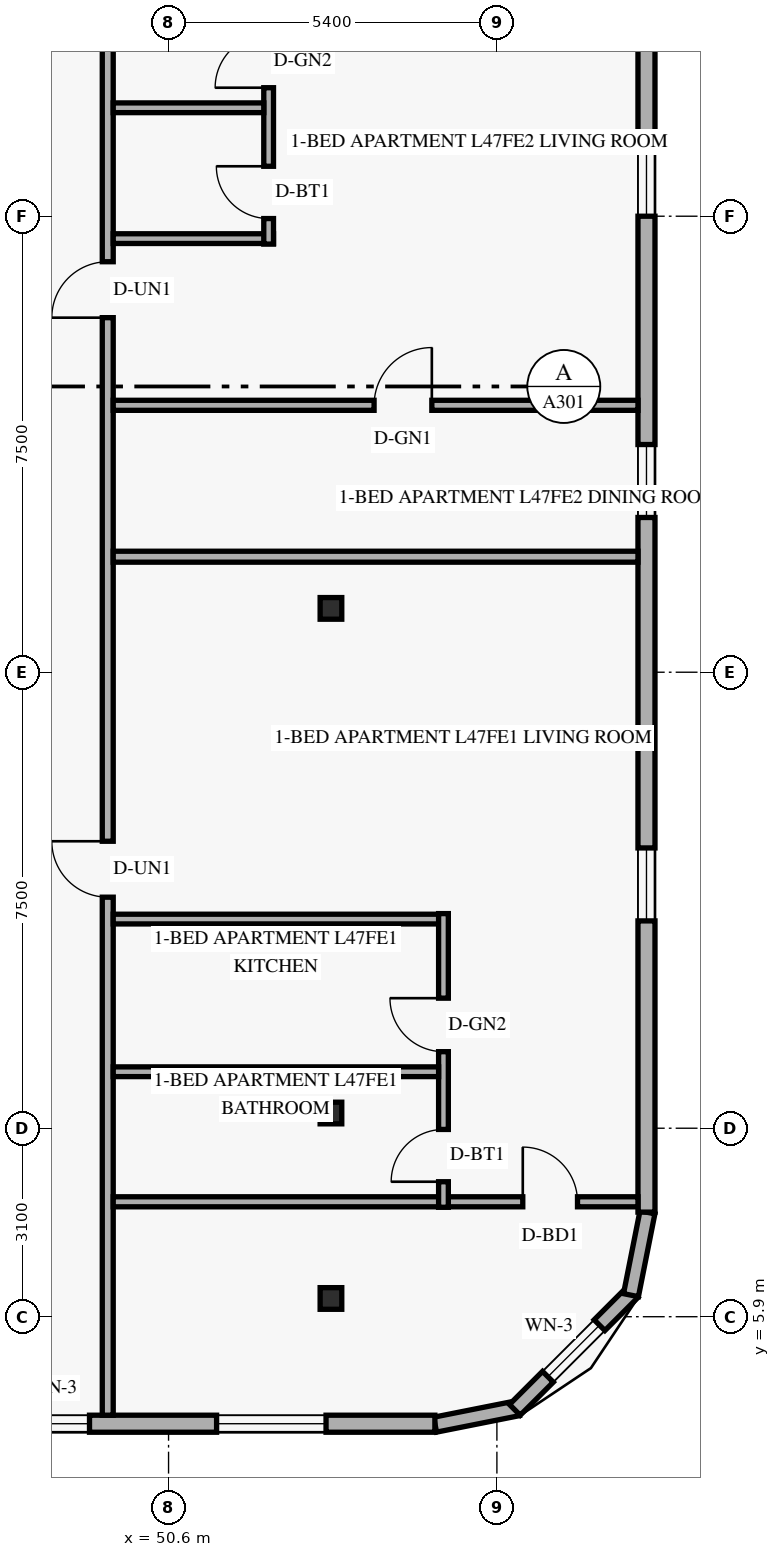
"""IFC4 building model, lengths in metres.
Left out: names, types, materials, properties, quantities, classifications, styles, units other than length and angle.
Written with IfcOpenShell. Run it as: python <this file> out.ifc"""

import sys

from ifc_helpers import new_model, si_unit, direction, frame, frame_2d, origin, origin_2d, place, context, subcontext, project, spatial, rectangle, hollow_rectangle, extrude, element, fill, save


model = new_model("IFC4")
c1 = context("Model", 3, precision=1e-05, world=origin(), true_north=direction((0.0, 1.0)))
c2 = subcontext(c1, "Body", "Model", "MODEL_VIEW")
j1 = project(units=[si_unit("LENGTHUNIT", "METRE"), si_unit("PLANEANGLEUNIT", "RADIAN")], contexts=[c1])
p1 = place(None, origin())
s1 = spatial("IfcSite", under=j1, at=p1, CompositionType="ELEMENT")
p2 = place(p1, origin())
s2 = spatial("IfcBuilding", under=s1, at=p2, CompositionType="ELEMENT")
p3 = place(p2, frame((0.0, 0.0, 181.2)))
s3 = spatial("IfcBuildingStorey", under=s2, at=p3, CompositionType="ELEMENT", Elevation=181.2)
for number, where, z_axis, x_axis in (
    (1, (53.167, 6.2, 0.0), (0.058, 0.0, 0.998), (0.0, 1.0, 0.0)),
    (2, (53.167, 9.25, 0.0), (0.058, 0.0, 0.998), (0.0, 1.0, 0.0)),
    (3, (53.167, 17.55, 0.0), (0.058, 0.0, 0.998), (0.0, 1.0, 0.0)),
):
    element("IfcColumn", number, at=place(p3, frame(where, z_axis=z_axis, x_axis=x_axis)), inside=s3, PredefinedType="COLUMN", context=c2, shape_type="SweptSolid", body=[
        extrude(hollow_rectangle(XDim=0.356, YDim=0.356, WallThickness=0.016, at=origin_2d()), origin(), (0.0, 0.0, 1.0), 3.606),
    ])
p4 = place(p3, frame((54.983, 4.124, 0.0), z_axis=(0.0, 0.0, 1.0), x_axis=(0.980809899341, 0.19496651342, 0.0)))
e4 = element("IfcWall", 4, at=p4, inside=s3, PredefinedType="SOLIDWALL", context=c2, shape_type="SweptSolid", body=[
    extrude(rectangle(XDim=1.389, YDim=0.25, at=frame_2d((0.694, 0.0))), origin(), (0.0, 0.0, 1.0), 3.36),
])
p5 = place(p3, frame((56.295, 4.368, 0.0), z_axis=(0.0, 0.0, 1.0), x_axis=(0.707106781187, 0.707106781187, 0.0)))
e5 = element("IfcWall", 5, at=p5, inside=s3, PredefinedType="SOLIDWALL", context=c2, shape_type="SweptSolid", body=[
    extrude(rectangle(XDim=2.739, YDim=0.25, at=frame_2d((1.37, 0.0))), origin(), (0.0, 0.0, 1.0), 3.36),
])
p6 = place(p5, frame((0.77, 0.0, 0.85)))
e6 = element("IfcOpeningElement", 6, at=p6, cuts=e5, PredefinedType="OPENING", context=c2, shape_type="SweptSolid", body=[
    extrude(rectangle(XDim=1.2, YDim=1.5, at=frame_2d((0.6, 0.75))), frame((0.0, 0.135, 0.0), z_axis=(0.0, -1.0, 0.0), x_axis=(1.0, 0.0, 0.0)), (0.0, 0.0, 1.0), 0.27),
])
p7 = place(p3, frame((58.205, 6.254, 0.0), z_axis=(0.0, 0.0, 1.0), x_axis=(0.19496651342, 0.980809899341, 0.0)))
e7 = element("IfcWall", 7, at=p7, inside=s3, PredefinedType="SOLIDWALL", context=c2, shape_type="SweptSolid", body=[
    extrude(rectangle(XDim=1.389, YDim=0.25, at=frame_2d((0.694, 0.0))), origin(), (0.0, 0.0, 1.0), 3.36),
])
p8 = place(p3, frame((21.22, 4.14, 0.0), z_axis=(0.0, 0.0, 1.0), x_axis=(1.0, 0.0, 0.0)))
e8 = element("IfcWall", 8, at=p8, inside=s3, PredefinedType="SOLIDWALL", context=c2, shape_type="SweptSolid", body=[
    extrude(rectangle(XDim=33.76, YDim=0.28, at=frame_2d((16.88, 0.0))), origin(), (0.0, 0.0, 1.0), 3.36),
])
p9 = place(p8, frame((1.905, 0.0, 0.85)))
e9 = element("IfcOpeningElement", 9, at=p9, cuts=e8, PredefinedType="OPENING", context=c2, shape_type="SweptSolid", body=[
    extrude(rectangle(XDim=1.8, YDim=1.6, at=frame_2d((0.9, 0.8))), frame((0.0, 0.15, 0.0), z_axis=(0.0, -1.0, 0.0), x_axis=(1.0, 0.0, 0.0)), (0.0, 0.0, 1.0), 0.3),
])
p10 = place(p8, frame((8.79, 0.0, 0.85)))
e10 = element("IfcOpeningElement", 10, at=p10, cuts=e8, PredefinedType="OPENING", context=c2, shape_type="SweptSolid", body=[
    extrude(rectangle(XDim=1.8, YDim=1.6, at=frame_2d((0.9, 0.8))), frame((0.0, 0.15, 0.0), z_axis=(0.0, -1.0, 0.0), x_axis=(1.0, 0.0, 0.0)), (0.0, 0.0, 1.0), 0.3),
])
p11 = place(p8, frame((14.665, 0.0, 0.85)))
e11 = element("IfcOpeningElement", 11, at=p11, cuts=e8, PredefinedType="OPENING", context=c2, shape_type="SweptSolid", body=[
    extrude(rectangle(XDim=1.2, YDim=1.5, at=frame_2d((0.6, 0.75))), frame((0.0, 0.15, 0.0), z_axis=(0.0, -1.0, 0.0), x_axis=(1.0, 0.0, 0.0)), (0.0, 0.0, 1.0), 0.3),
])
p12 = place(p8, frame((18.525, 0.0, 0.85)))
e12 = element("IfcOpeningElement", 12, at=p12, cuts=e8, PredefinedType="OPENING", context=c2, shape_type="SweptSolid", body=[
    extrude(rectangle(XDim=1.8, YDim=1.6, at=frame_2d((0.9, 0.8))), frame((0.0, 0.15, 0.0), z_axis=(0.0, -1.0, 0.0), x_axis=(1.0, 0.0, 0.0)), (0.0, 0.0, 1.0), 0.3),
])
p13 = place(p8, frame((23.65, 0.0, 0.85)))
e13 = element("IfcOpeningElement", 13, at=p13, cuts=e8, PredefinedType="OPENING", context=c2, shape_type="SweptSolid", body=[
    extrude(rectangle(XDim=1.8, YDim=1.6, at=frame_2d((0.9, 0.8))), frame((0.0, 0.15, 0.0), z_axis=(0.0, -1.0, 0.0), x_axis=(1.0, 0.0, 0.0)), (0.0, 0.0, 1.0), 0.3),
])
p14 = place(p8, frame((26.88, 0.0, 0.85)))
e14 = element("IfcOpeningElement", 14, at=p14, cuts=e8, PredefinedType="OPENING", context=c2, shape_type="SweptSolid", body=[
    extrude(rectangle(XDim=1.2, YDim=1.5, at=frame_2d((0.6, 0.75))), frame((0.0, 0.15, 0.0), z_axis=(0.0, -1.0, 0.0), x_axis=(1.0, 0.0, 0.0)), (0.0, 0.0, 1.0), 0.3),
])
p15 = place(p8, frame((30.17, 0.0, 0.85)))
e15 = element("IfcOpeningElement", 15, at=p15, cuts=e8, PredefinedType="OPENING", context=c2, shape_type="SweptSolid", body=[
    extrude(rectangle(XDim=1.8, YDim=1.6, at=frame_2d((0.9, 0.8))), frame((0.0, 0.15, 0.0), z_axis=(0.0, -1.0, 0.0), x_axis=(1.0, 0.0, 0.0)), (0.0, 0.0, 1.0), 0.3),
])
p16 = place(p3, frame((58.46, 7.62, 0.0), z_axis=(0.0, 0.0, 1.0), x_axis=(0.0, 1.0, 0.0)))
e16 = element("IfcWall", 16, at=p16, inside=s3, PredefinedType="SOLIDWALL", context=c2, shape_type="SweptSolid", body=[
    extrude(rectangle(XDim=32.76, YDim=0.28, at=frame_2d((16.38, 0.0))), origin(), (0.0, 0.0, 1.0), 3.36),
])
p17 = place(p16, frame((4.79, 0.0, 0.85)))
e17 = element("IfcOpeningElement", 17, at=p17, cuts=e16, PredefinedType="OPENING", context=c2, shape_type="SweptSolid", body=[
    extrude(rectangle(XDim=1.2, YDim=1.5, at=frame_2d((0.6, 0.75))), frame((0.0, 0.15, 0.0), z_axis=(0.0, -1.0, 0.0), x_axis=(1.0, 0.0, 0.0)), (0.0, 0.0, 1.0), 0.3),
])
p18 = place(p16, frame((11.425, 0.0, 0.85)))
e18 = element("IfcOpeningElement", 18, at=p18, cuts=e16, PredefinedType="OPENING", context=c2, shape_type="SweptSolid", body=[
    extrude(rectangle(XDim=1.2, YDim=1.5, at=frame_2d((0.6, 0.75))), frame((0.0, 0.15, 0.0), z_axis=(0.0, -1.0, 0.0), x_axis=(1.0, 0.0, 0.0)), (0.0, 0.0, 1.0), 0.3),
])
p19 = place(p16, frame((16.38, 0.0, 0.85)))
e19 = element("IfcOpeningElement", 19, at=p19, cuts=e16, PredefinedType="OPENING", context=c2, shape_type="SweptSolid", body=[
    extrude(rectangle(XDim=1.2, YDim=1.5, at=frame_2d((0.6, 0.75))), frame((0.0, 0.15, 0.0), z_axis=(0.0, -1.0, 0.0), x_axis=(1.0, 0.0, 0.0)), (0.0, 0.0, 1.0), 0.3),
])
p20 = place(p16, frame((22.135, 0.0, 0.85)))
e20 = element("IfcOpeningElement", 20, at=p20, cuts=e16, PredefinedType="OPENING", context=c2, shape_type="SweptSolid", body=[
    extrude(rectangle(XDim=1.2, YDim=1.5, at=frame_2d((0.6, 0.75))), frame((0.0, 0.15, 0.0), z_axis=(0.0, -1.0, 0.0), x_axis=(1.0, 0.0, 0.0)), (0.0, 0.0, 1.0), 0.3),
])
p21 = place(p16, frame((27.125, 0.0, 0.85)))
e21 = element("IfcOpeningElement", 21, at=p21, cuts=e16, PredefinedType="OPENING", context=c2, shape_type="SweptSolid", body=[
    extrude(rectangle(XDim=1.2, YDim=1.5, at=frame_2d((0.6, 0.75))), frame((0.0, 0.15, 0.0), z_axis=(0.0, -1.0, 0.0), x_axis=(1.0, 0.0, 0.0)), (0.0, 0.0, 1.0), 0.3),
])
p22 = place(p16, frame((31.115, 0.0, 0.85)))
e22 = element("IfcOpeningElement", 22, at=p22, cuts=e16, PredefinedType="OPENING", context=c2, shape_type="SweptSolid", body=[
    extrude(rectangle(XDim=1.2, YDim=1.5, at=frame_2d((0.6, 0.75))), frame((0.0, 0.15, 0.0), z_axis=(0.0, -1.0, 0.0), x_axis=(1.0, 0.0, 0.0)), (0.0, 0.0, 1.0), 0.3),
])
p23 = place(p3, frame((49.6, 4.28, 0.0), z_axis=(0.0, 0.0, 1.0), x_axis=(0.0, 1.0, 0.0)))
e23 = element("IfcWall", 23, at=p23, inside=s3, PredefinedType="STANDARD", context=c2, shape_type="SweptSolid", body=[
    extrude(rectangle(XDim=39.44, YDim=0.18, at=frame_2d((19.72, 0.0))), origin(), (0.0, 0.0, 1.0), 2.73),
])
p24 = place(p23, frame((8.52, 0.0, 0.0)))
e24 = element("IfcOpeningElement", 24, at=p24, cuts=e23, PredefinedType="OPENING", context=c2, shape_type="SweptSolid", body=[
    extrude(rectangle(XDim=0.92, YDim=2.15, at=frame_2d((0.46, 1.075))), frame((0.0, 0.1, 0.0), z_axis=(0.0, -1.0, 0.0), x_axis=(1.0, 0.0, 0.0)), (0.0, 0.0, 1.0), 0.2),
])
p25 = place(p23, frame((18.052, 0.0, 0.0)))
e25 = element("IfcOpeningElement", 25, at=p25, cuts=e23, PredefinedType="OPENING", context=c2, shape_type="SweptSolid", body=[
    extrude(rectangle(XDim=0.92, YDim=2.15, at=frame_2d((0.46, 1.075))), frame((0.0, 0.1, 0.0), z_axis=(0.0, -1.0, 0.0), x_axis=(1.0, 0.0, 0.0)), (0.0, 0.0, 1.0), 0.2),
])
p26 = place(p23, frame((33.12, 0.0, 0.0)))
e26 = element("IfcOpeningElement", 26, at=p26, cuts=e23, PredefinedType="OPENING", context=c2, shape_type="SweptSolid", body=[
    extrude(rectangle(XDim=0.92, YDim=2.15, at=frame_2d((0.46, 1.075))), frame((0.0, 0.1, 0.0), z_axis=(0.0, -1.0, 0.0), x_axis=(1.0, 0.0, 0.0)), (0.0, 0.0, 1.0), 0.2),
])
p27 = place(p3, frame((49.69, 7.79, 0.0), z_axis=(0.0, 0.0, 1.0), x_axis=(1.0, 0.0, 0.0)))
e27 = element("IfcWall", 27, at=p27, inside=s3, PredefinedType="PARTITIONING", context=c2, shape_type="SweptSolid", body=[
    extrude(rectangle(XDim=8.63, YDim=0.165, at=frame_2d((4.315, 0.0))), origin(), (0.0, 0.0, 1.0), 2.879),
])
p28 = place(p27, frame((6.736, 0.0, 0.0)))
e28 = element("IfcOpeningElement", 28, at=p28, cuts=e27, PredefinedType="OPENING", context=c2, shape_type="SweptSolid", body=[
    extrude(rectangle(XDim=0.9, YDim=2.14, at=frame_2d((0.45, 1.07))), frame((0.0, 0.093, 0.0), z_axis=(0.0, -1.0, 0.0), x_axis=(1.0, 0.0, 0.0)), (0.0, 0.0, 1.0), 0.185),
])
p29 = place(p3, frame((49.69, 12.44, 0.0), z_axis=(0.0, 0.0, 1.0), x_axis=(1.0, 0.0, 0.0)))
e29 = element("IfcWall", 29, at=p29, inside=s3, PredefinedType="PLUMBINGWALL", context=c2, shape_type="SweptSolid", body=[
    extrude(rectangle(XDim=5.511, YDim=0.16, at=frame_2d((2.756, 0.0))), origin(), (0.0, 0.0, 1.0), 2.879),
])
p30 = place(p3, frame((55.121, 7.7, 0.0), z_axis=(0.0, 0.0, 1.0), x_axis=(0.0, 1.0, 0.0)))
e30 = element("IfcWall", 30, at=p30, inside=s3, PredefinedType="PLUMBINGWALL", context=c2, shape_type="SweptSolid", body=[
    extrude(rectangle(XDim=4.83, YDim=0.16, at=frame_2d((2.415, 0.0))), origin(), (0.0, 0.0, 1.0), 3.36),
])
p31 = place(p30, frame((0.42, 0.0, 0.0)))
e31 = element("IfcOpeningElement", 31, at=p31, cuts=e30, PredefinedType="OPENING", context=c2, shape_type="SweptSolid", body=[
    extrude(rectangle(XDim=0.86, YDim=2.12, at=frame_2d((0.43, 1.06))), frame((0.0, 0.09, 0.0), z_axis=(0.0, -1.0, 0.0), x_axis=(1.0, 0.0, 0.0)), (0.0, 0.0, 1.0), 0.18),
])
p32 = place(p30, frame((2.559, 0.0, 0.0)))
e32 = element("IfcOpeningElement", 32, at=p32, cuts=e30, PredefinedType="OPENING", context=c2, shape_type="SweptSolid", body=[
    extrude(rectangle(XDim=0.88, YDim=2.12, at=frame_2d((0.44, 1.06))), frame((0.0, 0.09, 0.0), z_axis=(0.0, -1.0, 0.0), x_axis=(1.0, 0.0, 0.0)), (0.0, 0.0, 1.0), 0.18),
])
p33 = place(p3, frame((49.69, 9.929, 0.0), z_axis=(0.0, 0.0, 1.0), x_axis=(1.0, 0.0, 0.0)))
e33 = element("IfcWall", 33, at=p33, inside=s3, PredefinedType="PLUMBINGWALL", context=c2, shape_type="SweptSolid", body=[
    extrude(rectangle(XDim=5.351, YDim=0.16, at=frame_2d((2.676, 0.0))), origin(), (0.0, 0.0, 1.0), 2.879),
])
p34 = place(p3, frame((49.69, 18.4, 0.0), z_axis=(0.0, 0.0, 1.0), x_axis=(1.0, 0.0, 0.0)))
e34 = element("IfcWall", 34, at=p34, inside=s3, PredefinedType="PARTITIONING", context=c2, shape_type="SweptSolid", body=[
    extrude(rectangle(XDim=8.63, YDim=0.18, at=frame_2d((4.315, 0.0))), origin(), (0.0, 0.0, 1.0), 2.879),
])
p35 = place(p3, frame((49.69, 23.632, 0.0), z_axis=(0.0, 0.0, 1.0), x_axis=(1.0, 0.0, 0.0)))
e35 = element("IfcWall", 35, at=p35, inside=s3, PredefinedType="PLUMBINGWALL", context=c2, shape_type="SweptSolid", body=[
    extrude(rectangle(XDim=2.636, YDim=0.16, at=frame_2d((1.318, 0.0))), origin(), (0.0, 0.0, 1.0), 3.36),
])
p36 = place(p3, frame((52.246, 23.542, 0.0), z_axis=(0.0, 0.0, 1.0), x_axis=(0.0, 1.0, 0.0)))
e36 = element("IfcWall", 36, at=p36, inside=s3, PredefinedType="PLUMBINGWALL", context=c2, shape_type="SweptSolid", body=[
    extrude(rectangle(XDim=4.858, YDim=0.16, at=frame_2d((2.429, 0.0))), origin(), (0.0, 0.0, 1.0), 3.36),
])
p37 = place(p36, frame((0.42, 0.0, 0.0)))
e37 = element("IfcOpeningElement", 37, at=p37, cuts=e36, PredefinedType="OPENING", context=c2, shape_type="SweptSolid", body=[
    extrude(rectangle(XDim=0.86, YDim=2.12, at=frame_2d((0.43, 1.06))), frame((0.0, 0.09, 0.0), z_axis=(0.0, -1.0, 0.0), x_axis=(1.0, 0.0, 0.0)), (0.0, 0.0, 1.0), 0.18),
])
p38 = place(p36, frame((2.572, 0.0, 0.0)))
e38 = element("IfcOpeningElement", 38, at=p38, cuts=e36, PredefinedType="OPENING", context=c2, shape_type="SweptSolid", body=[
    extrude(rectangle(XDim=0.88, YDim=2.12, at=frame_2d((0.44, 1.06))), frame((0.0, 0.09, 0.0), z_axis=(0.0, -1.0, 0.0), x_axis=(1.0, 0.0, 0.0)), (0.0, 0.0, 1.0), 0.18),
])
p39 = place(p3, frame((49.69, 25.784, 0.0), z_axis=(0.0, 0.0, 1.0), x_axis=(1.0, 0.0, 0.0)))
e39 = element("IfcWall", 39, at=p39, inside=s3, PredefinedType="PLUMBINGWALL", context=c2, shape_type="SweptSolid", body=[
    extrude(rectangle(XDim=2.476, YDim=0.16, at=frame_2d((1.238, 0.0))), origin(), (0.0, 0.0, 1.0), 3.36),
])
p40 = place(p3, frame((49.69, 20.89, 0.0), z_axis=(0.0, 0.0, 1.0), x_axis=(1.0, 0.0, 0.0)))
e40 = element("IfcWall", 40, at=p40, inside=s3, PredefinedType="PARTITIONING", context=c2, shape_type="SweptSolid", body=[
    extrude(rectangle(XDim=8.63, YDim=0.165, at=frame_2d((4.315, 0.0))), origin(), (0.0, 0.0, 1.0), 2.879),
])
p41 = place(p40, frame((4.29, 0.0, 0.0)))
e41 = element("IfcOpeningElement", 41, at=p41, cuts=e40, PredefinedType="OPENING", context=c2, shape_type="SweptSolid", body=[
    extrude(rectangle(XDim=0.95, YDim=2.15, at=frame_2d((0.475, 1.075))), frame((0.0, 0.093, 0.0), z_axis=(0.0, -1.0, 0.0), x_axis=(1.0, 0.0, 0.0)), (0.0, 0.0, 1.0), 0.185),
])
p42 = place(p6, origin())
e42 = element("IfcWindow", 42, at=p42, inside=s3, PartitioningType="SINGLE_PANEL", PredefinedType="WINDOW", context=c2, shape_type="SweptSolid", body=[
    extrude(rectangle(XDim=1.2, YDim=1.5, at=frame_2d((0.6, 0.75))), frame((0.0, 0.03, 0.0), z_axis=(0.0, -1.0, 0.0), x_axis=(1.0, 0.0, 0.0)), (0.0, 0.0, 1.0), 0.06),
])
fill(e6, e42)
p43 = place(p14, origin())
e43 = element("IfcWindow", 43, at=p43, inside=s3, PartitioningType="SINGLE_PANEL", PredefinedType="WINDOW", context=c2, shape_type="SweptSolid", body=[
    extrude(rectangle(XDim=1.2, YDim=1.5, at=frame_2d((0.6, 0.75))), frame((0.0, 0.03, 0.0), z_axis=(0.0, -1.0, 0.0), x_axis=(1.0, 0.0, 0.0)), (0.0, 0.0, 1.0), 0.06),
])
fill(e14, e43)
p44 = place(p15, origin())
e44 = element("IfcWindow", 44, at=p44, inside=s3, PartitioningType="SINGLE_PANEL", PredefinedType="WINDOW", context=c2, shape_type="SweptSolid", body=[
    extrude(rectangle(XDim=1.8, YDim=1.6, at=frame_2d((0.9, 0.8))), frame((0.0, 0.03, 0.0), z_axis=(0.0, -1.0, 0.0), x_axis=(1.0, 0.0, 0.0)), (0.0, 0.0, 1.0), 0.06),
])
fill(e15, e44)
p45 = place(p17, origin())
e45 = element("IfcWindow", 45, at=p45, inside=s3, PartitioningType="SINGLE_PANEL", PredefinedType="WINDOW", context=c2, shape_type="SweptSolid", body=[
    extrude(rectangle(XDim=1.2, YDim=1.5, at=frame_2d((0.6, 0.75))), frame((0.0, 0.03, 0.0), z_axis=(0.0, -1.0, 0.0), x_axis=(1.0, 0.0, 0.0)), (0.0, 0.0, 1.0), 0.06),
])
fill(e17, e45)
p46 = place(p18, origin())
e46 = element("IfcWindow", 46, at=p46, inside=s3, PartitioningType="SINGLE_PANEL", PredefinedType="WINDOW", context=c2, shape_type="SweptSolid", body=[
    extrude(rectangle(XDim=1.2, YDim=1.5, at=frame_2d((0.6, 0.75))), frame((0.0, 0.03, 0.0), z_axis=(0.0, -1.0, 0.0), x_axis=(1.0, 0.0, 0.0)), (0.0, 0.0, 1.0), 0.06),
])
fill(e18, e46)
p47 = place(p19, origin())
e47 = element("IfcWindow", 47, at=p47, inside=s3, PartitioningType="SINGLE_PANEL", PredefinedType="WINDOW", context=c2, shape_type="SweptSolid", body=[
    extrude(rectangle(XDim=1.2, YDim=1.5, at=frame_2d((0.6, 0.75))), frame((0.0, 0.03, 0.0), z_axis=(0.0, -1.0, 0.0), x_axis=(1.0, 0.0, 0.0)), (0.0, 0.0, 1.0), 0.06),
])
fill(e19, e47)
p48 = place(p24, origin())
e48 = element("IfcDoor", 48, at=p48, inside=s3, OperationType="SINGLE_SWING_RIGHT", PredefinedType="DOOR", context=c2, shape_type="SweptSolid", body=[
    extrude(rectangle(XDim=0.92, YDim=2.15, at=frame_2d((0.46, 1.075))), frame((0.0, 0.025, 0.0), z_axis=(0.0, -1.0, 0.0), x_axis=(1.0, 0.0, 0.0)), (0.0, 0.0, 1.0), 0.05),
])
fill(e24, e48)
p49 = place(p31, origin())
e49 = element("IfcDoor", 49, at=p49, inside=s3, OperationType="SINGLE_SWING_LEFT", PredefinedType="DOOR", context=c2, shape_type="SweptSolid", body=[
    extrude(rectangle(XDim=0.86, YDim=2.12, at=frame_2d((0.43, 1.06))), frame((0.0, 0.025, 0.0), z_axis=(0.0, -1.0, 0.0), x_axis=(1.0, 0.0, 0.0)), (0.0, 0.0, 1.0), 0.05),
])
fill(e31, e49)
p50 = place(p32, origin())
e50 = element("IfcDoor", 50, at=p50, inside=s3, OperationType="SINGLE_SWING_RIGHT", PredefinedType="DOOR", context=c2, shape_type="SweptSolid", body=[
    extrude(rectangle(XDim=0.88, YDim=2.12, at=frame_2d((0.44, 1.06))), frame((0.0, 0.025, 0.0), z_axis=(0.0, -1.0, 0.0), x_axis=(1.0, 0.0, 0.0)), (0.0, 0.0, 1.0), 0.05),
])
fill(e32, e50)
p51 = place(p28, origin())
e51 = element("IfcDoor", 51, at=p51, inside=s3, OperationType="SINGLE_SWING_LEFT", PredefinedType="DOOR", context=c2, shape_type="SweptSolid", body=[
    extrude(rectangle(XDim=0.9, YDim=2.14, at=frame_2d((0.45, 1.07))), frame((0.0, 0.025, 0.0), z_axis=(0.0, -1.0, 0.0), x_axis=(1.0, 0.0, 0.0)), (0.0, 0.0, 1.0), 0.05),
])
fill(e28, e51)
p52 = place(p41, origin())
e52 = element("IfcDoor", 52, at=p52, inside=s3, OperationType="SINGLE_SWING_RIGHT", PredefinedType="DOOR", context=c2, shape_type="SweptSolid", body=[
    extrude(rectangle(XDim=0.95, YDim=2.15, at=frame_2d((0.475, 1.075))), frame((0.0, 0.025, 0.0), z_axis=(0.0, -1.0, 0.0), x_axis=(1.0, 0.0, 0.0)), (0.0, 0.0, 1.0), 0.05),
])
fill(e41, e52)
p53 = place(p25, origin())
e53 = element("IfcDoor", 53, at=p53, inside=s3, OperationType="SINGLE_SWING_LEFT", PredefinedType="DOOR", context=c2, shape_type="SweptSolid", body=[
    extrude(rectangle(XDim=0.92, YDim=2.15, at=frame_2d((0.46, 1.075))), frame((0.0, 0.025, 0.0), z_axis=(0.0, -1.0, 0.0), x_axis=(1.0, 0.0, 0.0)), (0.0, 0.0, 1.0), 0.05),
])
fill(e25, e53)
p54 = place(p37, origin())
e54 = element("IfcDoor", 54, at=p54, inside=s3, OperationType="SINGLE_SWING_RIGHT", PredefinedType="DOOR", context=c2, shape_type="SweptSolid", body=[
    extrude(rectangle(XDim=0.86, YDim=2.12, at=frame_2d((0.43, 1.06))), frame((0.0, 0.025, 0.0), z_axis=(0.0, -1.0, 0.0), x_axis=(1.0, 0.0, 0.0)), (0.0, 0.0, 1.0), 0.05),
])
fill(e37, e54)
p55 = place(p38, origin())
e55 = element("IfcDoor", 55, at=p55, inside=s3, OperationType="SINGLE_SWING_LEFT", PredefinedType="DOOR", context=c2, shape_type="SweptSolid", body=[
    extrude(rectangle(XDim=0.88, YDim=2.12, at=frame_2d((0.44, 1.06))), frame((0.0, 0.025, 0.0), z_axis=(0.0, -1.0, 0.0), x_axis=(1.0, 0.0, 0.0)), (0.0, 0.0, 1.0), 0.05),
])
fill(e38, e55)
save(model, sys.argv[1])
